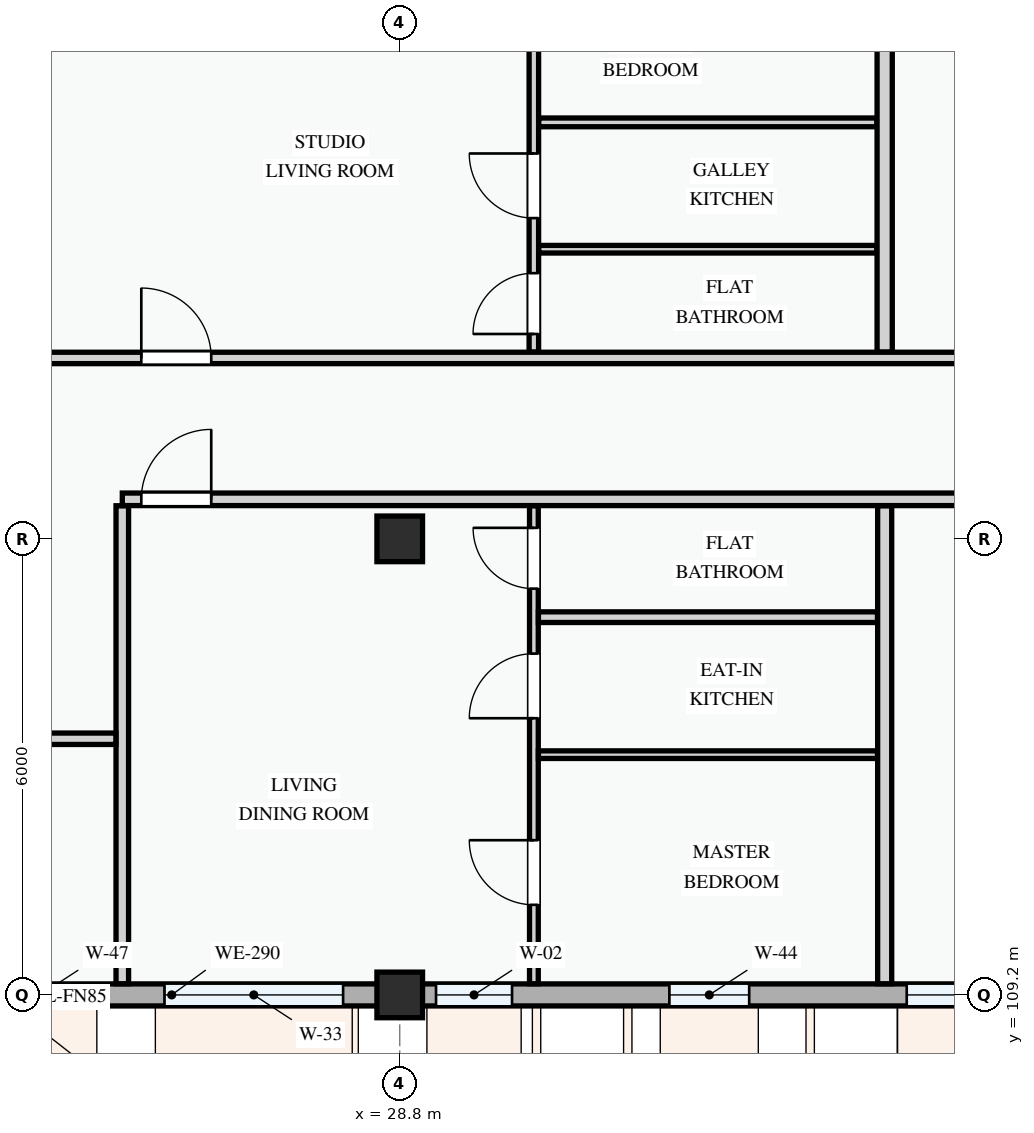
"""IFC4 building model, lengths in metres.
Left out: names, types, materials, properties, quantities, classifications, styles, units other than length and angle.
Written with IfcOpenShell. Run it as: python <this file> out.ifc"""

import sys

from ifc_helpers import new_model, si_unit, direction, frame, frame_2d, origin, origin_2d, place, context, subcontext, project, spatial, rectangle, extrude, element, fill, save


model = new_model("IFC4")
c1 = context("Model", 3, precision=1e-05, world=origin(), true_north=direction((0.0, 1.0)))
c2 = subcontext(c1, "Body", "Model", "MODEL_VIEW")
j1 = project(units=[si_unit("LENGTHUNIT", "METRE"), si_unit("PLANEANGLEUNIT", "RADIAN")], contexts=[c1])
p1 = place(None, origin())
s1 = spatial("IfcSite", under=j1, at=p1, CompositionType="ELEMENT")
p2 = place(p1, origin())
s2 = spatial("IfcBuilding", under=s1, at=p2, CompositionType="ELEMENT")
p3 = place(p2, frame((0.0, 0.0, 27.9)))
s3 = spatial("IfcBuildingStorey", under=s2, at=p3, CompositionType="ELEMENT", Elevation=27.9)
for number, where, z_axis, x_axis in (
    (1, (28.8, 109.2, 0.0), (0.0, 0.0, 1.0), (1.0, 0.0, 0.0)),
    (2, (28.8, 115.2, 0.0), (0.0, 0.0, 1.0), (1.0, 0.0, 0.0)),
):
    element("IfcColumn", number, at=place(p3, frame(where, z_axis=z_axis, x_axis=x_axis)), inside=s3, PredefinedType="COLUMN", context=c2, shape_type="SweptSolid", body=[
        extrude(rectangle(XDim=0.6, YDim=0.6, at=origin_2d()), origin(), (0.0, 0.0, 1.0), 3.3),
    ])
p4 = place(p3, frame((22.8, 109.2, 0.0), z_axis=(0.0, 0.0, 1.0), x_axis=(1.0, 0.0, 0.0)))
e3 = element("IfcWall", 3, at=p4, inside=s3, PredefinedType="STANDARD", context=c2, shape_type="SweptSolid", body=[
    extrude(rectangle(XDim=6.0, YDim=0.29, at=frame_2d((3.0, 0.0))), origin(), (0.0, 0.0, 1.0), 2.475),
])
p5 = place(p4, frame((0.645, 0.0, 0.78)))
e4 = element("IfcOpeningElement", 4, at=p5, cuts=e3, PredefinedType="OPENING", context=c2, shape_type="SweptSolid", body=[
    extrude(rectangle(XDim=1.25, YDim=1.45, at=frame_2d((0.625, 0.725))), frame((0.0, 0.155, 0.0), z_axis=(0.0, -1.0, 0.0), x_axis=(1.0, 0.0, 0.0)), (0.0, 0.0, 1.0), 0.31),
])
p6 = place(p4, frame((2.905, 0.0, 0.78)))
e5 = element("IfcOpeningElement", 5, at=p6, cuts=e3, PredefinedType="OPENING", context=c2, shape_type="SweptSolid", body=[
    extrude(rectangle(XDim=2.35, YDim=1.55, at=frame_2d((1.175, 0.775))), frame((0.0, 0.155, 0.0), z_axis=(0.0, -1.0, 0.0), x_axis=(1.0, 0.0, 0.0)), (0.0, 0.0, 1.0), 0.31),
])
p7 = place(p3, frame((28.8, 109.2, 0.0), z_axis=(0.0, 0.0, 1.0), x_axis=(1.0, 0.0, 0.0)))
e6 = element("IfcWall", 6, at=p7, inside=s3, PredefinedType="STANDARD", context=c2, shape_type="SweptSolid", body=[
    extrude(rectangle(XDim=8.4, YDim=0.29, at=frame_2d((4.2, 0.0))), origin(), (0.0, 0.0, 1.0), 2.375),
])
p8 = place(p7, frame((0.478, 0.0, 0.78)))
e7 = element("IfcOpeningElement", 7, at=p8, cuts=e6, PredefinedType="OPENING", context=c2, shape_type="SweptSolid", body=[
    extrude(rectangle(XDim=1.0, YDim=1.25, at=frame_2d((0.5, 0.625))), frame((0.0, 0.155, 0.0), z_axis=(0.0, -1.0, 0.0), x_axis=(1.0, 0.0, 0.0)), (0.0, 0.0, 1.0), 0.31),
])
p9 = place(p7, frame((3.548, 0.0, 0.78)))
e8 = element("IfcOpeningElement", 8, at=p9, cuts=e6, PredefinedType="OPENING", context=c2, shape_type="SweptSolid", body=[
    extrude(rectangle(XDim=1.05, YDim=1.2, at=frame_2d((0.525, 0.6))), frame((0.0, 0.155, 0.0), z_axis=(0.0, -1.0, 0.0), x_axis=(1.0, 0.0, 0.0)), (0.0, 0.0, 1.0), 0.31),
])
p10 = place(p7, frame((6.67, 0.0, 0.78)))
e9 = element("IfcOpeningElement", 9, at=p10, cuts=e6, PredefinedType="OPENING", context=c2, shape_type="SweptSolid", body=[
    extrude(rectangle(XDim=1.25, YDim=1.45, at=frame_2d((0.625, 0.725))), frame((0.0, 0.155, 0.0), z_axis=(0.0, -1.0, 0.0), x_axis=(1.0, 0.0, 0.0)), (0.0, 0.0, 1.0), 0.31),
])
p11 = place(p3, frame((25.15, 109.347, 0.0), z_axis=(0.0, 0.0, 1.0), x_axis=(0.0, 1.0, 0.0)))
e10 = element("IfcWall", 10, at=p11, inside=s3, PredefinedType="PARTITIONING", context=c2, shape_type="SweptSolid", body=[
    extrude(rectangle(XDim=6.289, YDim=0.165, at=frame_2d((3.144, 0.0))), origin(), (0.0, 0.0, 1.0), 3.0),
])
p12 = place(p3, frame((22.66, 112.57, 0.0), z_axis=(0.0, 0.0, 1.0), x_axis=(1.0, 0.0, 0.0)))
e11 = element("IfcWall", 11, at=p12, inside=s3, PredefinedType="PARTITIONING", context=c2, shape_type="SweptSolid", body=[
    extrude(rectangle(XDim=2.406, YDim=0.15, at=frame_2d((1.203, 0.0))), origin(), (0.0, 0.0, 1.0), 3.0),
])
p13 = place(p3, frame((30.565, 109.347, 0.0), z_axis=(0.0, 0.0, 1.0), x_axis=(0.0, 1.0, 0.0)))
e12 = element("IfcWall", 12, at=p13, inside=s3, PredefinedType="PARTITIONING", context=c2, shape_type="SweptSolid", body=[
    extrude(rectangle(XDim=6.289, YDim=0.115, at=frame_2d((3.144, 0.0))), origin(), (0.0, 0.0, 1.0), 3.0),
])
p14 = place(p13, frame((1.038, 0.0, 0.0)))
e13 = element("IfcOpeningElement", 13, at=p14, cuts=e12, PredefinedType="OPENING", context=c2, shape_type="SweptSolid", body=[
    extrude(rectangle(XDim=0.85, YDim=2.1, at=frame_2d((0.425, 1.05))), frame((0.0, 0.067, 0.0), z_axis=(0.0, -1.0, 0.0), x_axis=(1.0, 0.0, 0.0)), (0.0, 0.0, 1.0), 0.135),
])
p15 = place(p13, frame((3.493, 0.0, 0.0)))
e14 = element("IfcOpeningElement", 14, at=p15, cuts=e12, PredefinedType="OPENING", context=c2, shape_type="SweptSolid", body=[
    extrude(rectangle(XDim=0.85, YDim=2.1, at=frame_2d((0.425, 1.05))), frame((0.0, 0.067, 0.0), z_axis=(0.0, -1.0, 0.0), x_axis=(1.0, 0.0, 0.0)), (0.0, 0.0, 1.0), 0.135),
])
p16 = place(p13, frame((5.198, 0.0, 0.0)))
e15 = element("IfcOpeningElement", 15, at=p16, cuts=e12, PredefinedType="OPENING", context=c2, shape_type="SweptSolid", body=[
    extrude(rectangle(XDim=0.8, YDim=2.1, at=frame_2d((0.4, 1.05))), frame((0.0, 0.067, 0.0), z_axis=(0.0, -1.0, 0.0), x_axis=(1.0, 0.0, 0.0)), (0.0, 0.0, 1.0), 0.135),
])
p17 = place(p3, frame((30.625, 112.361, 0.0), z_axis=(0.0, 0.0, 1.0), x_axis=(1.0, 0.0, 0.0)))
e16 = element("IfcWall", 16, at=p17, inside=s3, PredefinedType="PARTITIONING", context=c2, shape_type="SweptSolid", body=[
    extrude(rectangle(XDim=4.461, YDim=0.1, at=frame_2d((2.23, 0.0))), origin(), (0.0, 0.0, 1.0), 3.0),
])
p18 = place(p3, frame((30.625, 114.17, 0.0), z_axis=(0.0, 0.0, 1.0), x_axis=(1.0, 0.0, 0.0)))
e17 = element("IfcWall", 17, at=p18, inside=s3, PredefinedType="PARTITIONING", context=c2, shape_type="SweptSolid", body=[
    extrude(rectangle(XDim=4.461, YDim=0.14, at=frame_2d((2.23, 0.0))), origin(), (0.0, 0.0, 1.0), 3.0),
])
p19 = place(p3, frame((30.564, 117.657, 0.0), z_axis=(0.0, 0.0, 1.0), x_axis=(0.0, 1.0, 0.0)))
e18 = element("IfcWall", 18, at=p19, inside=s3, PredefinedType="PARTITIONING", context=c2, shape_type="SweptSolid", body=[
    extrude(rectangle(XDim=5.796, YDim=0.125, at=frame_2d((2.898, 0.0))), origin(), (0.0, 0.0, 1.0), 3.0),
])
p20 = place(p19, frame((0.238, 0.0, 0.0)))
e19 = element("IfcOpeningElement", 19, at=p20, cuts=e18, PredefinedType="OPENING", context=c2, shape_type="SweptSolid", body=[
    extrude(rectangle(XDim=0.8, YDim=2.1, at=frame_2d((0.4, 1.05))), frame((0.0, 0.073, 0.0), z_axis=(0.0, -1.0, 0.0), x_axis=(1.0, 0.0, 0.0)), (0.0, 0.0, 1.0), 0.145),
])
p21 = place(p19, frame((1.763, 0.0, 0.0)))
e20 = element("IfcOpeningElement", 20, at=p21, cuts=e18, PredefinedType="OPENING", context=c2, shape_type="SweptSolid", body=[
    extrude(rectangle(XDim=0.85, YDim=2.1, at=frame_2d((0.425, 1.05))), frame((0.0, 0.073, 0.0), z_axis=(0.0, -1.0, 0.0), x_axis=(1.0, 0.0, 0.0)), (0.0, 0.0, 1.0), 0.145),
])
p22 = place(p19, frame((4.028, 0.0, 0.0)))
e21 = element("IfcOpeningElement", 21, at=p22, cuts=e18, PredefinedType="OPENING", context=c2, shape_type="SweptSolid", body=[
    extrude(rectangle(XDim=0.85, YDim=2.1, at=frame_2d((0.425, 1.05))), frame((0.0, 0.073, 0.0), z_axis=(0.0, -1.0, 0.0), x_axis=(1.0, 0.0, 0.0)), (0.0, 0.0, 1.0), 0.145),
])
p23 = place(p3, frame((30.629, 120.679, 0.0), z_axis=(0.0, 0.0, 1.0), x_axis=(1.0, 0.0, 0.0)))
e22 = element("IfcWall", 22, at=p23, inside=s3, PredefinedType="PARTITIONING", context=c2, shape_type="SweptSolid", body=[
    extrude(rectangle(XDim=4.449, YDim=0.115, at=frame_2d((2.225, 0.0))), origin(), (0.0, 0.0, 1.0), 3.0),
])
p24 = place(p3, frame((30.629, 119.01, 0.0), z_axis=(0.0, 0.0, 1.0), x_axis=(1.0, 0.0, 0.0)))
e23 = element("IfcWall", 23, at=p24, inside=s3, PredefinedType="PARTITIONING", context=c2, shape_type="SweptSolid", body=[
    extrude(rectangle(XDim=4.449, YDim=0.1, at=frame_2d((2.225, 0.0))), origin(), (0.0, 0.0, 1.0), 3.0),
])
p25 = place(p3, frame((35.18, 109.347, 0.0), z_axis=(0.0, 0.0, 1.0), x_axis=(0.0, 1.0, 0.0)))
e24 = element("IfcWall", 24, at=p25, inside=s3, PredefinedType="PARTITIONING", context=c2, shape_type="SweptSolid", body=[
    extrude(rectangle(XDim=6.289, YDim=0.185, at=frame_2d((3.144, 0.0))), origin(), (0.0, 0.0, 1.0), 3.0),
])
p26 = place(p3, frame((35.18, 117.657, 0.0), z_axis=(0.0, 0.0, 1.0), x_axis=(0.0, 1.0, 0.0)))
e25 = element("IfcWall", 25, at=p26, inside=s3, PredefinedType="PARTITIONING", context=c2, shape_type="SweptSolid", body=[
    extrude(rectangle(XDim=5.796, YDim=0.2, at=frame_2d((2.898, 0.0))), origin(), (0.0, 0.0, 1.0), 3.0),
])
p27 = place(p3, frame((25.15, 115.72, 0.0), z_axis=(0.0, 0.0, 1.0), x_axis=(1.0, 0.0, 0.0)))
e26 = element("IfcWall", 26, at=p27, inside=s3, PredefinedType="PARTITIONING", context=c2, shape_type="SweptSolid", body=[
    extrude(rectangle(XDim=26.303, YDim=0.165, at=frame_2d((13.151, 0.0))), origin(), (0.0, 0.0, 1.0), 3.0),
])
p28 = place(p27, frame((0.25, 0.0, 0.0)))
e27 = element("IfcOpeningElement", 27, at=p28, cuts=e26, PredefinedType="OPENING", context=c2, shape_type="SweptSolid", body=[
    extrude(rectangle(XDim=0.92, YDim=2.1, at=frame_2d((0.46, 1.05))), frame((0.0, 0.093, 0.0), z_axis=(0.0, -1.0, 0.0), x_axis=(1.0, 0.0, 0.0)), (0.0, 0.0, 1.0), 0.185),
])
p29 = place(p27, frame((13.72, 0.0, 0.0)))
e28 = element("IfcOpeningElement", 28, at=p29, cuts=e26, PredefinedType="OPENING", context=c2, shape_type="SweptSolid", body=[
    extrude(rectangle(XDim=0.92, YDim=2.1, at=frame_2d((0.46, 1.05))), frame((0.0, 0.093, 0.0), z_axis=(0.0, -1.0, 0.0), x_axis=(1.0, 0.0, 0.0)), (0.0, 0.0, 1.0), 0.185),
])
p30 = place(p27, frame((21.786, 0.0, 0.0)))
e29 = element("IfcOpeningElement", 29, at=p30, cuts=e26, PredefinedType="OPENING", context=c2, shape_type="SweptSolid", body=[
    extrude(rectangle(XDim=0.96, YDim=2.12, at=frame_2d((0.48, 1.06))), frame((0.0, 0.093, 0.0), z_axis=(0.0, -1.0, 0.0), x_axis=(1.0, 0.0, 0.0)), (0.0, 0.0, 1.0), 0.185),
])
p31 = place(p3, frame((22.66, 117.58, 0.0), z_axis=(0.0, 0.0, 1.0), x_axis=(1.0, 0.0, 0.0)))
e30 = element("IfcWall", 30, at=p31, inside=s3, PredefinedType="PARTITIONING", context=c2, shape_type="SweptSolid", body=[
    extrude(rectangle(XDim=28.793, YDim=0.15, at=frame_2d((14.396, 0.0))), origin(), (0.0, 0.0, 1.0), 3.0),
])
p32 = place(p31, frame((2.74, 0.0, 0.0)))
e31 = element("IfcOpeningElement", 31, at=p32, cuts=e30, PredefinedType="OPENING", context=c2, shape_type="SweptSolid", body=[
    extrude(rectangle(XDim=0.92, YDim=2.1, at=frame_2d((0.46, 1.05))), frame((0.0, 0.085, 0.0), z_axis=(0.0, -1.0, 0.0), x_axis=(1.0, 0.0, 0.0)), (0.0, 0.0, 1.0), 0.17),
])
p33 = place(p31, frame((16.014, 0.0, 0.0)))
e32 = element("IfcOpeningElement", 32, at=p33, cuts=e30, PredefinedType="OPENING", context=c2, shape_type="SweptSolid", body=[
    extrude(rectangle(XDim=0.92, YDim=2.1, at=frame_2d((0.46, 1.05))), frame((0.0, 0.085, 0.0), z_axis=(0.0, -1.0, 0.0), x_axis=(1.0, 0.0, 0.0)), (0.0, 0.0, 1.0), 0.17),
])
p34 = place(p31, frame((24.259, 0.0, 0.0)))
e33 = element("IfcOpeningElement", 33, at=p34, cuts=e30, PredefinedType="OPENING", context=c2, shape_type="SweptSolid", body=[
    extrude(rectangle(XDim=0.92, YDim=2.1, at=frame_2d((0.46, 1.05))), frame((0.0, 0.085, 0.0), z_axis=(0.0, -1.0, 0.0), x_axis=(1.0, 0.0, 0.0)), (0.0, 0.0, 1.0), 0.17),
])
p35 = place(p5, origin())
e34 = element("IfcWindow", 34, at=p35, inside=s3, PartitioningType="SINGLE_PANEL", PredefinedType="WINDOW", context=c2, shape_type="SweptSolid", body=[
    extrude(rectangle(XDim=1.25, YDim=1.45, at=frame_2d((0.625, 0.725))), frame((0.0, 0.03, 0.0), z_axis=(0.0, -1.0, 0.0), x_axis=(1.0, 0.0, 0.0)), (0.0, 0.0, 1.0), 0.06),
])
fill(e4, e34)
p36 = place(p6, origin())
e35 = element("IfcWindow", 35, at=p36, inside=s3, PartitioningType="DOUBLE_PANEL_VERTICAL", PredefinedType="WINDOW", context=c2, shape_type="SweptSolid", body=[
    extrude(rectangle(XDim=2.35, YDim=1.55, at=frame_2d((1.175, 0.775))), frame((0.0, 0.03, 0.0), z_axis=(0.0, -1.0, 0.0), x_axis=(1.0, 0.0, 0.0)), (0.0, 0.0, 1.0), 0.06),
])
fill(e5, e35)
p37 = place(p8, origin())
e36 = element("IfcWindow", 36, at=p37, inside=s3, PartitioningType="SINGLE_PANEL", PredefinedType="WINDOW", context=c2, shape_type="SweptSolid", body=[
    extrude(rectangle(XDim=1.0, YDim=1.25, at=frame_2d((0.5, 0.625))), frame((0.0, 0.03, 0.0), z_axis=(0.0, -1.0, 0.0), x_axis=(1.0, 0.0, 0.0)), (0.0, 0.0, 1.0), 0.06),
])
fill(e7, e36)
p38 = place(p9, origin())
e37 = element("IfcWindow", 37, at=p38, inside=s3, PartitioningType="SINGLE_PANEL", PredefinedType="WINDOW", context=c2, shape_type="SweptSolid", body=[
    extrude(rectangle(XDim=1.05, YDim=1.2, at=frame_2d((0.525, 0.6))), frame((0.0, 0.03, 0.0), z_axis=(0.0, -1.0, 0.0), x_axis=(1.0, 0.0, 0.0)), (0.0, 0.0, 1.0), 0.06),
])
fill(e8, e37)
p39 = place(p10, origin())
e38 = element("IfcWindow", 38, at=p39, inside=s3, PartitioningType="SINGLE_PANEL", PredefinedType="WINDOW", context=c2, shape_type="SweptSolid", body=[
    extrude(rectangle(XDim=1.25, YDim=1.45, at=frame_2d((0.625, 0.725))), frame((0.0, 0.03, 0.0), z_axis=(0.0, -1.0, 0.0), x_axis=(1.0, 0.0, 0.0)), (0.0, 0.0, 1.0), 0.06),
])
fill(e9, e38)
p40 = place(p14, origin())
e39 = element("IfcDoor", 39, at=p40, inside=s3, OperationType="SINGLE_SWING_RIGHT", PredefinedType="DOOR", context=c2, shape_type="SweptSolid", body=[
    extrude(rectangle(XDim=0.85, YDim=2.1, at=frame_2d((0.425, 1.05))), frame((0.0, 0.025, 0.0), z_axis=(0.0, -1.0, 0.0), x_axis=(1.0, 0.0, 0.0)), (0.0, 0.0, 1.0), 0.05),
])
fill(e13, e39)
p41 = place(p15, origin())
e40 = element("IfcDoor", 40, at=p41, inside=s3, OperationType="SINGLE_SWING_LEFT", PredefinedType="DOOR", context=c2, shape_type="SweptSolid", body=[
    extrude(rectangle(XDim=0.85, YDim=2.1, at=frame_2d((0.425, 1.05))), frame((0.0, 0.025, 0.0), z_axis=(0.0, -1.0, 0.0), x_axis=(1.0, 0.0, 0.0)), (0.0, 0.0, 1.0), 0.05),
])
fill(e14, e40)
p42 = place(p16, origin())
e41 = element("IfcDoor", 41, at=p42, inside=s3, OperationType="SINGLE_SWING_RIGHT", PredefinedType="DOOR", context=c2, shape_type="SweptSolid", body=[
    extrude(rectangle(XDim=0.8, YDim=2.1, at=frame_2d((0.4, 1.05))), frame((0.0, 0.025, 0.0), z_axis=(0.0, -1.0, 0.0), x_axis=(1.0, 0.0, 0.0)), (0.0, 0.0, 1.0), 0.05),
])
fill(e15, e41)
p43 = place(p20, origin())
e42 = element("IfcDoor", 42, at=p43, inside=s3, OperationType="SINGLE_SWING_LEFT", PredefinedType="DOOR", context=c2, shape_type="SweptSolid", body=[
    extrude(rectangle(XDim=0.8, YDim=2.1, at=frame_2d((0.4, 1.05))), frame((0.0, 0.025, 0.0), z_axis=(0.0, -1.0, 0.0), x_axis=(1.0, 0.0, 0.0)), (0.0, 0.0, 1.0), 0.05),
])
fill(e19, e42)
p44 = place(p21, origin())
e43 = element("IfcDoor", 43, at=p44, inside=s3, OperationType="SINGLE_SWING_RIGHT", PredefinedType="DOOR", context=c2, shape_type="SweptSolid", body=[
    extrude(rectangle(XDim=0.85, YDim=2.1, at=frame_2d((0.425, 1.05))), frame((0.0, 0.025, 0.0), z_axis=(0.0, -1.0, 0.0), x_axis=(1.0, 0.0, 0.0)), (0.0, 0.0, 1.0), 0.05),
])
fill(e20, e43)
p45 = place(p28, origin())
e44 = element("IfcDoor", 44, at=p45, inside=s3, OperationType="SINGLE_SWING_RIGHT", PredefinedType="DOOR", context=c2, shape_type="SweptSolid", body=[
    extrude(rectangle(XDim=0.92, YDim=2.1, at=frame_2d((0.46, 1.05))), frame((0.0, 0.025, 0.0), z_axis=(0.0, -1.0, 0.0), x_axis=(1.0, 0.0, 0.0)), (0.0, 0.0, 1.0), 0.05),
])
fill(e27, e44)
p46 = place(p32, origin())
e45 = element("IfcDoor", 45, at=p46, inside=s3, OperationType="SINGLE_SWING_LEFT", PredefinedType="DOOR", context=c2, shape_type="SweptSolid", body=[
    extrude(rectangle(XDim=0.92, YDim=2.1, at=frame_2d((0.46, 1.05))), frame((0.0, 0.025, 0.0), z_axis=(0.0, -1.0, 0.0), x_axis=(1.0, 0.0, 0.0)), (0.0, 0.0, 1.0), 0.05),
])
fill(e31, e45)
save(model, sys.argv[1])
